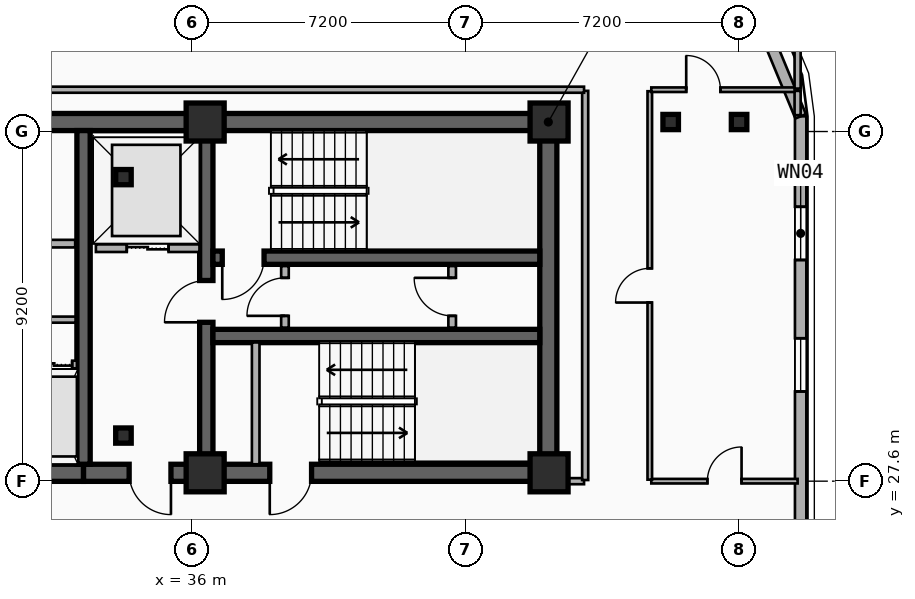
"""IFC4 building model, lengths in metres.
Left out: names, types, materials, properties, quantities, classifications, styles, units other than length and angle.
Written with IfcOpenShell. Run it as: python <this file> out.ifc"""

import sys

from ifc_helpers import new_model, si_unit, direction, frame, frame_2d, origin, origin_2d, place, context, subcontext, project, spatial, rectangle, i_section, extrude, element, fill, save


model = new_model("IFC4")
c1 = context("Model", 3, precision=1e-05, world=origin(), true_north=direction((0.0, 1.0)))
c2 = subcontext(c1, "Body", "Model", "MODEL_VIEW")
j1 = project(units=[si_unit("LENGTHUNIT", "METRE"), si_unit("PLANEANGLEUNIT", "RADIAN")], contexts=[c1])
p1 = place(None, origin())
s1 = spatial("IfcSite", under=j1, at=p1, CompositionType="ELEMENT")
p2 = place(p1, origin())
s2 = spatial("IfcBuilding", under=s1, at=p2, CompositionType="ELEMENT")
p3 = place(p2, frame((0.0, 0.0, 211.2)))
s3 = spatial("IfcBuildingStorey", under=s2, at=p3, CompositionType="ELEMENT", Elevation=211.2)
p4 = place(p3, frame((12.15, 37.05, 0.0), z_axis=(0.0, 0.0, 1.0), x_axis=(1.0, 0.0, 0.0)))
e1 = element("IfcWall", 1, at=p4, inside=s3, PredefinedType="SHEAR", context=c2, shape_type="SweptSolid", body=[
    extrude(rectangle(XDim=33.23, YDim=0.45, at=frame_2d((16.615, 0.0))), origin(), (0.0, 0.0, 1.0), 3.6),
])
p5 = place(p3, frame((33.15, 27.82, 0.0), z_axis=(0.0, 0.0, 1.0), x_axis=(-1.0, 0.0, 0.0)))
e2 = element("IfcWall", 2, at=p5, inside=s3, PredefinedType="SHEAR", context=c2, shape_type="SweptSolid", body=[
    extrude(rectangle(XDim=11.97, YDim=0.45, at=frame_2d((5.985, 0.0))), origin(), (0.0, 0.0, 1.0), 3.6),
])
p6 = place(p5, frame((6.1, 0.0, 0.0)))
e3 = element("IfcOpeningElement", 3, at=p6, cuts=e2, PredefinedType="OPENING", context=c2, shape_type="SweptSolid", body=[
    extrude(rectangle(XDim=1.6, YDim=2.2, at=frame_2d((0.8, 1.1))), frame((0.0, 0.235, 0.0), z_axis=(0.0, -1.0, 0.0), x_axis=(1.0, 0.0, 0.0)), (0.0, 0.0, 1.0), 0.47),
])
p7 = place(p3, frame((45.38, 27.82, 0.0), z_axis=(0.0, 0.0, 1.0), x_axis=(-1.0, 0.0, 0.0)))
e4 = element("IfcWall", 4, at=p7, inside=s3, PredefinedType="SHEAR", context=c2, shape_type="SweptSolid", body=[
    extrude(rectangle(XDim=12.23, YDim=0.45, at=frame_2d((6.115, 0.0))), origin(), (0.0, 0.0, 1.0), 3.6),
])
p8 = place(p7, frame((9.93, 0.0, 0.0)))
e5 = element("IfcOpeningElement", 5, at=p8, cuts=e4, PredefinedType="OPENING", context=c2, shape_type="SweptSolid", body=[
    extrude(rectangle(XDim=1.1, YDim=2.15, at=frame_2d((0.55, 1.075))), frame((0.0, 0.235, 0.0), z_axis=(0.0, -1.0, 0.0), x_axis=(1.0, 0.0, 0.0)), (0.0, 0.0, 1.0), 0.47),
])
p9 = place(p7, frame((6.23, 0.0, 0.0)))
e6 = element("IfcOpeningElement", 6, at=p9, cuts=e4, PredefinedType="OPENING", context=c2, shape_type="SweptSolid", body=[
    extrude(rectangle(XDim=1.1, YDim=2.15, at=frame_2d((0.55, 1.075))), frame((0.0, 0.235, 0.0), z_axis=(0.0, -1.0, 0.0), x_axis=(1.0, 0.0, 0.0)), (0.0, 0.0, 1.0), 0.47),
])
p10 = place(p3, frame((45.38, 28.045, 0.0), z_axis=(0.0, 0.0, 1.0), x_axis=(0.0, 1.0, 0.0)))
e7 = element("IfcWall", 7, at=p10, inside=s3, PredefinedType="SHEAR", context=c2, shape_type="SweptSolid", body=[
    extrude(rectangle(XDim=8.78, YDim=0.45, at=frame_2d((4.39, 0.0))), origin(), (0.0, 0.0, 1.0), 3.6),
])
p11 = place(p3, frame((33.15, 28.045, 0.0), z_axis=(0.0, 0.0, 1.0), x_axis=(0.0, 1.0, 0.0)))
e8 = element("IfcWall", 8, at=p11, inside=s3, PredefinedType="SHEAR", context=c2, shape_type="SweptSolid", body=[
    extrude(rectangle(XDim=8.78, YDim=0.35, at=frame_2d((4.39, 0.0))), origin(), (0.0, 0.0, 1.0), 3.6),
])
p12 = place(p3, frame((36.38, 28.045, 0.0), z_axis=(0.0, 0.0, 1.0), x_axis=(0.0, 1.0, 0.0)))
e9 = element("IfcWall", 9, at=p12, inside=s3, PredefinedType="SHEAR", context=c2, shape_type="SweptSolid", body=[
    extrude(rectangle(XDim=8.78, YDim=0.35, at=frame_2d((4.39, 0.0))), origin(), (0.0, 0.0, 1.0), 3.6),
])
p13 = place(p12, frame((3.735, 0.0, 0.0)))
e10 = element("IfcOpeningElement", 10, at=p13, cuts=e9, PredefinedType="OPENING", context=c2, shape_type="SweptSolid", body=[
    extrude(rectangle(XDim=1.1, YDim=2.15, at=frame_2d((0.55, 1.075))), frame((0.0, 0.185, 0.0), z_axis=(0.0, -1.0, 0.0), x_axis=(1.0, 0.0, 0.0)), (0.0, 0.0, 1.0), 0.37),
])
p14 = place(p3, frame((45.155, 33.48, 0.0), z_axis=(0.0, 0.0, 1.0), x_axis=(-1.0, 0.0, 0.0)))
e11 = element("IfcWall", 11, at=p14, inside=s3, PredefinedType="SHEAR", context=c2, shape_type="SweptSolid", body=[
    extrude(rectangle(XDim=8.6, YDim=0.35, at=frame_2d((4.3, 0.0))), origin(), (0.0, 0.0, 1.0), 3.6),
])
p15 = place(p14, frame((7.255, 0.0, 0.0)))
e12 = element("IfcOpeningElement", 12, at=p15, cuts=e11, PredefinedType="OPENING", context=c2, shape_type="SweptSolid", body=[
    extrude(rectangle(XDim=1.1, YDim=2.15, at=frame_2d((0.55, 1.075))), frame((0.0, 0.185, 0.0), z_axis=(0.0, -1.0, 0.0), x_axis=(1.0, 0.0, 0.0)), (0.0, 0.0, 1.0), 0.37),
])
p16 = place(p3, frame((36.555, 31.42, 0.0), z_axis=(0.0, 0.0, 1.0), x_axis=(1.0, 0.0, 0.0)))
e13 = element("IfcWall", 13, at=p16, inside=s3, PredefinedType="SHEAR", context=c2, shape_type="SweptSolid", body=[
    extrude(rectangle(XDim=8.6, YDim=0.35, at=frame_2d((4.3, 0.0))), origin(), (0.0, 0.0, 1.0), 3.6),
])
for number, where, z_axis, x_axis in (
    (14, (34.2, 28.8, 0.0), (0.0, 0.0, 1.0), (1.0, 0.0, 0.0)),
    (15, (34.2, 35.6, 0.0), (0.0, 0.0, 1.0), (1.0, 0.0, 0.0)),
):
    element("IfcColumn", number, at=place(p3, frame(where, z_axis=z_axis, x_axis=x_axis)), inside=s3, PredefinedType="COLUMN", context=c2, shape_type="SweptSolid", body=[
        extrude(i_section(OverallWidth=0.408, OverallDepth=0.4, WebThickness=0.025, FlangeThickness=0.039, FilletRadius=0.015, at=origin_2d()), origin(), (0.0, 0.0, 1.0), 3.6),
    ])
for number, where, z_axis, x_axis in (
    (16, (36.35, 27.82, 0.0), (0.0, 0.0, 1.0), (1.0, 0.0, 0.0)),
    (17, (36.35, 37.05, 0.0), (0.0, 0.0, 1.0), (1.0, 0.0, 0.0)),
    (18, (45.4, 27.82, 0.0), (0.0, 0.0, 1.0), (1.0, 0.0, 0.0)),
    (19, (45.4, 37.05, 0.0), (0.0, 0.0, 1.0), (1.0, 0.0, 0.0)),
):
    element("IfcColumn", number, at=place(p3, frame(where, z_axis=z_axis, x_axis=x_axis)), inside=s3, PredefinedType="COLUMN", context=c2, shape_type="SweptSolid", body=[
        extrude(rectangle(XDim=1.0, YDim=1.0, at=origin_2d()), origin(), (0.0, 0.0, 1.0), 3.6),
    ])
for number, where, z_axis, x_axis in (
    (20, (48.6, 37.05, 0.0), (0.0, 0.0, 1.0), (1.0, 0.0, 0.0)),
    (21, (50.4, 37.05, 0.0), (0.0, 0.0, 1.0), (1.0, 0.0, 0.0)),
):
    element("IfcColumn", number, at=place(p3, frame(where, z_axis=z_axis, x_axis=x_axis)), inside=s3, PredefinedType="COLUMN", context=c2, shape_type="SweptSolid", body=[
        extrude(i_section(OverallWidth=0.408, OverallDepth=0.4, WebThickness=0.025, FlangeThickness=0.039, FilletRadius=0.015, at=origin_2d()), origin(), (0.0, 0.0, 1.0), 3.6),
    ])
p17 = place(p3, frame((52.02, 37.2, 0.0), z_axis=(0.0, 0.0, 1.0), x_axis=(0.0, -1.0, 0.0)))
e22 = element("IfcWall", 22, at=p17, inside=s3, PredefinedType="SOLIDWALL", context=c2, shape_type="SweptSolid", body=[
    extrude(rectangle(XDim=28.6, YDim=0.3, at=frame_2d((14.3, 0.0))), origin(), (0.0, 0.0, 1.0), 3.34),
])
p18 = place(p17, frame((2.38, 0.0, 0.34)))
e23 = element("IfcOpeningElement", 23, at=p18, cuts=e22, PredefinedType="OPENING", context=c2, shape_type="SweptSolid", body=[
    extrude(rectangle(XDim=1.4, YDim=2.1, at=frame_2d((0.7, 1.05))), frame((0.0, 0.16, 0.0), z_axis=(0.0, -1.0, 0.0), x_axis=(1.0, 0.0, 0.0)), (0.0, 0.0, 1.0), 0.32),
])
p19 = place(p17, frame((5.84, 0.0, 0.34)))
e24 = element("IfcOpeningElement", 24, at=p19, cuts=e22, PredefinedType="OPENING", context=c2, shape_type="SweptSolid", body=[
    extrude(rectangle(XDim=1.4, YDim=2.1, at=frame_2d((0.7, 1.05))), frame((0.0, 0.16, 0.0), z_axis=(0.0, -1.0, 0.0), x_axis=(1.0, 0.0, 0.0)), (0.0, 0.0, 1.0), 0.32),
])
p20 = place(p17, frame((21.635, 0.0, 0.34)))
e25 = element("IfcOpeningElement", 25, at=p20, cuts=e22, PredefinedType="OPENING", context=c2, shape_type="SweptSolid", body=[
    extrude(rectangle(XDim=1.4, YDim=2.1, at=frame_2d((0.7, 1.05))), frame((0.0, 0.16, 0.0), z_axis=(0.0, -1.0, 0.0), x_axis=(1.0, 0.0, 0.0)), (0.0, 0.0, 1.0), 0.32),
])
p21 = place(p17, frame((24.957, 0.0, 0.34)))
e26 = element("IfcOpeningElement", 26, at=p21, cuts=e22, PredefinedType="OPENING", context=c2, shape_type="SweptSolid", body=[
    extrude(rectangle(XDim=1.4, YDim=2.1, at=frame_2d((0.7, 1.05))), frame((0.0, 0.16, 0.0), z_axis=(0.0, -1.0, 0.0), x_axis=(1.0, 0.0, 0.0)), (0.0, 0.0, 1.0), 0.32),
])
p22 = place(p3, frame((50.843, 40.042, 0.0), z_axis=(0.0, 0.0, 1.0), x_axis=(0.382704529509, -0.923870793506, 0.0)))
e27 = element("IfcWall", 27, at=p22, inside=s3, PredefinedType="SOLIDWALL", context=c2, shape_type="SweptSolid", body=[
    extrude(rectangle(XDim=3.077, YDim=0.3, at=frame_2d((1.538, 0.0))), origin(), (0.0, 0.0, 1.0), 3.34),
])
p23 = place(p3, frame((33.475, 33.73, 0.0), z_axis=(0.0, 0.0, 1.0), x_axis=(1.0, 0.0, 0.0)))
e28 = element("IfcWall", 28, at=p23, inside=s3, PredefinedType="PARTITIONING", context=c2, shape_type="SweptSolid", body=[
    extrude(rectangle(XDim=2.725, YDim=0.2, at=frame_2d((1.362, 0.0))), origin(), (0.0, 0.0, 1.0), 2.41),
])
p24 = place(p23, frame((0.812, 0.0, 0.0)))
e29 = element("IfcOpeningElement", 29, at=p24, cuts=e28, PredefinedType="OPENING", context=c2, shape_type="SweptSolid", body=[
    extrude(rectangle(XDim=1.1, YDim=2.15, at=frame_2d((0.55, 1.075))), frame((0.0, 0.11, 0.0), z_axis=(0.0, -1.0, 0.0), x_axis=(1.0, 0.0, 0.0)), (0.0, 0.0, 1.0), 0.22),
])
p25 = place(p3, frame((31.775, 30.67, 0.0), z_axis=(0.0, 0.0, 1.0), x_axis=(1.0, 0.0, 0.0)))
e30 = element("IfcWall", 30, at=p25, inside=s3, PredefinedType="PARTITIONING", context=c2, shape_type="SweptSolid", body=[
    extrude(rectangle(XDim=1.2, YDim=0.2, at=frame_2d((0.6, 0.0))), origin(), (0.0, 0.0, 1.0), 2.72),
])
p26 = place(p25, frame((0.125, 0.0, 0.0)))
e31 = element("IfcOpeningElement", 31, at=p26, cuts=e30, PredefinedType="OPENING", context=c2, shape_type="SweptSolid", body=[
    extrude(rectangle(XDim=0.95, YDim=2.15, at=frame_2d((0.475, 1.075))), frame((0.0, 0.11, 0.0), z_axis=(0.0, -1.0, 0.0), x_axis=(1.0, 0.0, 0.0)), (0.0, 0.0, 1.0), 0.22),
])
p27 = place(p3, frame((37.68, 28.045, 0.0), z_axis=(0.0, 0.0, 1.0), x_axis=(0.0, 1.0, 0.0)))
e32 = element("IfcWall", 32, at=p27, inside=s3, PredefinedType="PARTITIONING", context=c2, shape_type="SweptSolid", body=[
    extrude(rectangle(XDim=3.205, YDim=0.2, at=frame_2d((1.603, 0.0))), origin(), (0.0, 0.0, 1.0), 2.72),
])
p28 = place(p3, frame((38.45, 31.64, 0.0), z_axis=(0.0, 0.0, 1.0), x_axis=(0.0, 1.0, 0.0)))
e33 = element("IfcWall", 33, at=p28, inside=s3, PredefinedType="PARTITIONING", context=c2, shape_type="SweptSolid", body=[
    extrude(rectangle(XDim=1.62, YDim=0.2, at=frame_2d((0.81, 0.0))), origin(), (0.0, 0.0, 1.0), 3.34),
])
p29 = place(p28, frame((0.31, 0.0, 0.0)))
e34 = element("IfcOpeningElement", 34, at=p29, cuts=e33, PredefinedType="OPENING", context=c2, shape_type="SweptSolid", body=[
    extrude(rectangle(XDim=1.0, YDim=2.15, at=frame_2d((0.5, 1.075))), frame((0.0, 0.11, 0.0), z_axis=(0.0, -1.0, 0.0), x_axis=(1.0, 0.0, 0.0)), (0.0, 0.0, 1.0), 0.22),
])
p30 = place(p3, frame((42.85, 31.64, 0.0), z_axis=(0.0, 0.0, 1.0), x_axis=(0.0, 1.0, 0.0)))
e35 = element("IfcWall", 35, at=p30, inside=s3, PredefinedType="PARTITIONING", context=c2, shape_type="SweptSolid", body=[
    extrude(rectangle(XDim=1.62, YDim=0.2, at=frame_2d((0.81, 0.0))), origin(), (0.0, 0.0, 1.0), 3.34),
])
p31 = place(p30, frame((0.31, 0.0, 0.0)))
e36 = element("IfcOpeningElement", 36, at=p31, cuts=e35, PredefinedType="OPENING", context=c2, shape_type="SweptSolid", body=[
    extrude(rectangle(XDim=1.0, YDim=2.15, at=frame_2d((0.5, 1.075))), frame((0.0, 0.11, 0.0), z_axis=(0.0, -1.0, 0.0), x_axis=(1.0, 0.0, 0.0)), (0.0, 0.0, 1.0), 0.22),
])
p32 = place(p3, frame((29.09, 33.85, 0.0), z_axis=(0.0, 0.0, 1.0), x_axis=(1.0, 0.0, 0.0)))
e37 = element("IfcWall", 37, at=p32, inside=s3, PredefinedType="PARTITIONING", context=c2, shape_type="SweptSolid", body=[
    extrude(rectangle(XDim=3.84, YDim=0.2, at=frame_2d((1.92, 0.0))), origin(), (0.0, 0.0, 1.0), 2.41),
])
p33 = place(p32, frame((1.32, 0.0, 0.0)))
e38 = element("IfcOpeningElement", 38, at=p33, cuts=e37, PredefinedType="OPENING", context=c2, shape_type="SweptSolid", body=[
    extrude(rectangle(XDim=1.2, YDim=2.15, at=frame_2d((0.6, 1.075))), frame((0.0, 0.11, 0.0), z_axis=(0.0, -1.0, 0.0), x_axis=(1.0, 0.0, 0.0)), (0.0, 0.0, 1.0), 0.22),
])
p34 = place(p3, frame((48.09, 27.6, 0.0), z_axis=(0.0, 0.0, 1.0), x_axis=(1.0, 0.0, 0.0)))
e39 = element("IfcWall", 39, at=p34, inside=s3, PredefinedType="PARTITIONING", context=c2, shape_type="SweptSolid", body=[
    extrude(rectangle(XDim=3.85, YDim=0.12, at=frame_2d((1.925, 0.0))), origin(), (0.0, 0.0, 1.0), 2.67),
])
p35 = place(p34, frame((1.475, 0.0, 0.0)))
e40 = element("IfcOpeningElement", 40, at=p35, cuts=e39, PredefinedType="OPENING", context=c2, shape_type="SweptSolid", body=[
    extrude(rectangle(XDim=0.9, YDim=2.1, at=frame_2d((0.45, 1.05))), frame((0.0, 0.07, 0.0), z_axis=(0.0, -1.0, 0.0), x_axis=(1.0, 0.0, 0.0)), (0.0, 0.0, 1.0), 0.14),
])
p36 = place(p3, frame((48.05, 27.64, 0.0), z_axis=(0.0, 0.0, 1.0), x_axis=(0.0, 1.0, 0.0)))
e41 = element("IfcWall", 41, at=p36, inside=s3, PredefinedType="PARTITIONING", context=c2, shape_type="SweptSolid", body=[
    extrude(rectangle(XDim=10.22, YDim=0.12, at=frame_2d((5.11, 0.0))), origin(), (0.0, 0.0, 1.0), 2.82),
])
p37 = place(p36, frame((4.66, 0.0, 0.0)))
e42 = element("IfcOpeningElement", 42, at=p37, cuts=e41, PredefinedType="OPENING", context=c2, shape_type="SweptSolid", body=[
    extrude(rectangle(XDim=0.9, YDim=2.1, at=frame_2d((0.45, 1.05))), frame((0.0, 0.07, 0.0), z_axis=(0.0, -1.0, 0.0), x_axis=(1.0, 0.0, 0.0)), (0.0, 0.0, 1.0), 0.14),
])
p38 = place(p3, frame((48.09, 37.9, 0.0), z_axis=(0.0, 0.0, 1.0), x_axis=(1.0, 0.0, 0.0)))
e43 = element("IfcWall", 43, at=p38, inside=s3, PredefinedType="PARTITIONING", context=c2, shape_type="SweptSolid", body=[
    extrude(rectangle(XDim=3.85, YDim=0.12, at=frame_2d((1.925, 0.0))), origin(), (0.0, 0.0, 1.0), 3.34),
])
p39 = place(p38, frame((0.919, 0.0, 0.0)))
e44 = element("IfcOpeningElement", 44, at=p39, cuts=e43, PredefinedType="OPENING", context=c2, shape_type="SweptSolid", body=[
    extrude(rectangle(XDim=0.9, YDim=2.1, at=frame_2d((0.45, 1.05))), frame((0.0, 0.07, 0.0), z_axis=(0.0, -1.0, 0.0), x_axis=(1.0, 0.0, 0.0)), (0.0, 0.0, 1.0), 0.14),
])
p40 = place(p3, frame((27.63, 31.85, 0.0), z_axis=(0.0, 0.0, 1.0), x_axis=(1.0, 0.0, 0.0)))
e45 = element("IfcWall", 45, at=p40, inside=s3, PredefinedType="PARTITIONING", context=c2, shape_type="SweptSolid", body=[
    extrude(rectangle(XDim=5.31, YDim=0.16, at=frame_2d((2.655, 0.0))), origin(), (0.0, 0.0, 1.0), 2.41),
])
p41 = place(p3, frame((45.41, 27.6, 0.0), z_axis=(0.0, 0.0, 1.0), x_axis=(1.0, 0.0, 0.0)))
e46 = element("IfcWall", 46, at=p41, inside=s3, PredefinedType="PARTITIONING", context=c2, shape_type="SweptSolid", body=[
    extrude(rectangle(XDim=0.91, YDim=0.16, at=frame_2d((0.455, 0.0))), origin(), (0.0, 0.0, 1.0), 2.41),
])
p42 = place(p3, frame((46.35, 27.63, 0.0), z_axis=(0.0, 0.0, 1.0), x_axis=(0.0, 1.0, 0.0)))
e47 = element("IfcWall", 47, at=p42, inside=s3, PredefinedType="PARTITIONING", context=c2, shape_type="SweptSolid", body=[
    extrude(rectangle(XDim=10.24, YDim=0.16, at=frame_2d((5.12, 0.0))), origin(), (0.0, 0.0, 1.0), 2.82),
])
p43 = place(p3, frame((11.28, 37.9, 0.0), z_axis=(0.0, 0.0, 1.0), x_axis=(1.0, 0.0, 0.0)))
e48 = element("IfcWall", 48, at=p43, inside=s3, PredefinedType="PARTITIONING", context=c2, shape_type="SweptSolid", body=[
    extrude(rectangle(XDim=35.04, YDim=0.16, at=frame_2d((17.52, 0.0))), origin(), (0.0, 0.0, 1.0), 3.34),
])
p44 = place(p3, frame((51.94, 37.93, 0.0), z_axis=(0.0, 0.0, 1.0), x_axis=(0.0, 1.0, 0.0)))
e49 = element("IfcWall", 49, at=p44, inside=s3, PredefinedType="PARTITIONING", context=c2, shape_type="SweptSolid", body=[
    extrude(rectangle(XDim=1.44, YDim=0.16, at=frame_2d((0.72, 0.0))), origin(), (0.0, 0.0, 1.0), 3.34),
])
p45 = place(p3, frame((51.94, 37.23, 0.0), z_axis=(0.0, 0.0, 1.0), x_axis=(0.0, 1.0, 0.0)))
e50 = element("IfcWall", 50, at=p45, inside=s3, PredefinedType="PARTITIONING", context=c2, shape_type="SweptSolid", body=[
    extrude(rectangle(XDim=0.64, YDim=0.16, at=frame_2d((0.32, 0.0))), origin(), (0.0, 0.0, 1.0), 3.34),
])
p46 = place(p18, origin())
e51 = element("IfcWindow", 51, at=p46, inside=s3, PartitioningType="SINGLE_PANEL", PredefinedType="WINDOW", context=c2, shape_type="SweptSolid", body=[
    extrude(rectangle(XDim=1.4, YDim=2.1, at=frame_2d((0.7, 1.05))), frame((0.0, 0.03, 0.0), z_axis=(0.0, -1.0, 0.0), x_axis=(1.0, 0.0, 0.0)), (0.0, 0.0, 1.0), 0.06),
])
fill(e23, e51)
p47 = place(p19, origin())
e52 = element("IfcWindow", 52, at=p47, inside=s3, PartitioningType="SINGLE_PANEL", PredefinedType="WINDOW", context=c2, shape_type="SweptSolid", body=[
    extrude(rectangle(XDim=1.4, YDim=2.1, at=frame_2d((0.7, 1.05))), frame((0.0, 0.03, 0.0), z_axis=(0.0, -1.0, 0.0), x_axis=(1.0, 0.0, 0.0)), (0.0, 0.0, 1.0), 0.06),
])
fill(e24, e52)
p48 = place(p24, origin())
e53 = element("IfcDoor", 53, at=p48, inside=s3, OperationType="DOUBLE_DOOR_SLIDING", PredefinedType="DOOR", context=c2, shape_type="SweptSolid", body=[
    extrude(rectangle(XDim=1.1, YDim=2.15, at=frame_2d((0.55, 1.075))), frame((0.0, 0.025, 0.0), z_axis=(0.0, -1.0, 0.0), x_axis=(1.0, 0.0, 0.0)), (0.0, 0.0, 1.0), 0.05),
])
fill(e29, e53)
p49 = place(p26, origin())
e54 = element("IfcDoor", 54, at=p49, inside=s3, OperationType="DOUBLE_DOOR_SLIDING", PredefinedType="DOOR", context=c2, shape_type="SweptSolid", body=[
    extrude(rectangle(XDim=0.95, YDim=2.15, at=frame_2d((0.475, 1.075))), frame((0.0, 0.025, 0.0), z_axis=(0.0, -1.0, 0.0), x_axis=(1.0, 0.0, 0.0)), (0.0, 0.0, 1.0), 0.05),
])
fill(e31, e54)
p50 = place(p15, origin())
e55 = element("IfcDoor", 55, at=p50, inside=s3, OperationType="SINGLE_SWING_RIGHT", PredefinedType="DOOR", context=c2, shape_type="SweptSolid", body=[
    extrude(rectangle(XDim=1.1, YDim=2.15, at=frame_2d((0.55, 1.075))), frame((0.0, 0.025, 0.0), z_axis=(0.0, -1.0, 0.0), x_axis=(1.0, 0.0, 0.0)), (0.0, 0.0, 1.0), 0.05),
])
fill(e12, e55)
p51 = place(p13, origin())
e56 = element("IfcDoor", 56, at=p51, inside=s3, OperationType="SINGLE_SWING_LEFT", PredefinedType="DOOR", context=c2, shape_type="SweptSolid", body=[
    extrude(rectangle(XDim=1.1, YDim=2.15, at=frame_2d((0.55, 1.075))), frame((0.0, 0.025, 0.0), z_axis=(0.0, -1.0, 0.0), x_axis=(1.0, 0.0, 0.0)), (0.0, 0.0, 1.0), 0.05),
])
fill(e10, e56)
p52 = place(p8, origin())
e57 = element("IfcDoor", 57, at=p52, inside=s3, OperationType="SINGLE_SWING_LEFT", PredefinedType="DOOR", context=c2, shape_type="SweptSolid", body=[
    extrude(rectangle(XDim=1.1, YDim=2.15, at=frame_2d((0.55, 1.075))), frame((0.0, 0.025, 0.0), z_axis=(0.0, -1.0, 0.0), x_axis=(1.0, 0.0, 0.0)), (0.0, 0.0, 1.0), 0.05),
])
fill(e5, e57)
p53 = place(p9, origin())
e58 = element("IfcDoor", 58, at=p53, inside=s3, OperationType="SINGLE_SWING_RIGHT", PredefinedType="DOOR", context=c2, shape_type="SweptSolid", body=[
    extrude(rectangle(XDim=1.1, YDim=2.15, at=frame_2d((0.55, 1.075))), frame((0.0, 0.025, 0.0), z_axis=(0.0, -1.0, 0.0), x_axis=(1.0, 0.0, 0.0)), (0.0, 0.0, 1.0), 0.05),
])
fill(e6, e58)
p54 = place(p29, origin())
e59 = element("IfcDoor", 59, at=p54, inside=s3, OperationType="SINGLE_SWING_LEFT", PredefinedType="DOOR", context=c2, shape_type="SweptSolid", body=[
    extrude(rectangle(XDim=1.0, YDim=2.15, at=frame_2d((0.5, 1.075))), frame((0.0, 0.025, 0.0), z_axis=(0.0, -1.0, 0.0), x_axis=(1.0, 0.0, 0.0)), (0.0, 0.0, 1.0), 0.05),
])
fill(e34, e59)
p55 = place(p31, origin())
e60 = element("IfcDoor", 60, at=p55, inside=s3, OperationType="SINGLE_SWING_RIGHT", PredefinedType="DOOR", context=c2, shape_type="SweptSolid", body=[
    extrude(rectangle(XDim=1.0, YDim=2.15, at=frame_2d((0.5, 1.075))), frame((0.0, 0.025, 0.0), z_axis=(0.0, -1.0, 0.0), x_axis=(1.0, 0.0, 0.0)), (0.0, 0.0, 1.0), 0.05),
])
fill(e36, e60)
p56 = place(p35, origin())
e61 = element("IfcDoor", 61, at=p56, inside=s3, OperationType="SINGLE_SWING_RIGHT", PredefinedType="DOOR", context=c2, shape_type="SweptSolid", body=[
    extrude(rectangle(XDim=0.9, YDim=2.1, at=frame_2d((0.45, 1.05))), frame((0.0, 0.025, 0.0), z_axis=(0.0, -1.0, 0.0), x_axis=(1.0, 0.0, 0.0)), (0.0, 0.0, 1.0), 0.05),
])
fill(e40, e61)
p57 = place(p37, origin())
e62 = element("IfcDoor", 62, at=p57, inside=s3, OperationType="SINGLE_SWING_LEFT", PredefinedType="DOOR", context=c2, shape_type="SweptSolid", body=[
    extrude(rectangle(XDim=0.9, YDim=2.1, at=frame_2d((0.45, 1.05))), frame((0.0, 0.025, 0.0), z_axis=(0.0, -1.0, 0.0), x_axis=(1.0, 0.0, 0.0)), (0.0, 0.0, 1.0), 0.05),
])
fill(e42, e62)
p58 = place(p39, origin())
e63 = element("IfcDoor", 63, at=p58, inside=s3, OperationType="SINGLE_SWING_LEFT", PredefinedType="DOOR", context=c2, shape_type="SweptSolid", body=[
    extrude(rectangle(XDim=0.9, YDim=2.1, at=frame_2d((0.45, 1.05))), frame((0.0, 0.025, 0.0), z_axis=(0.0, -1.0, 0.0), x_axis=(1.0, 0.0, 0.0)), (0.0, 0.0, 1.0), 0.05),
])
fill(e44, e63)
save(model, sys.argv[1])
